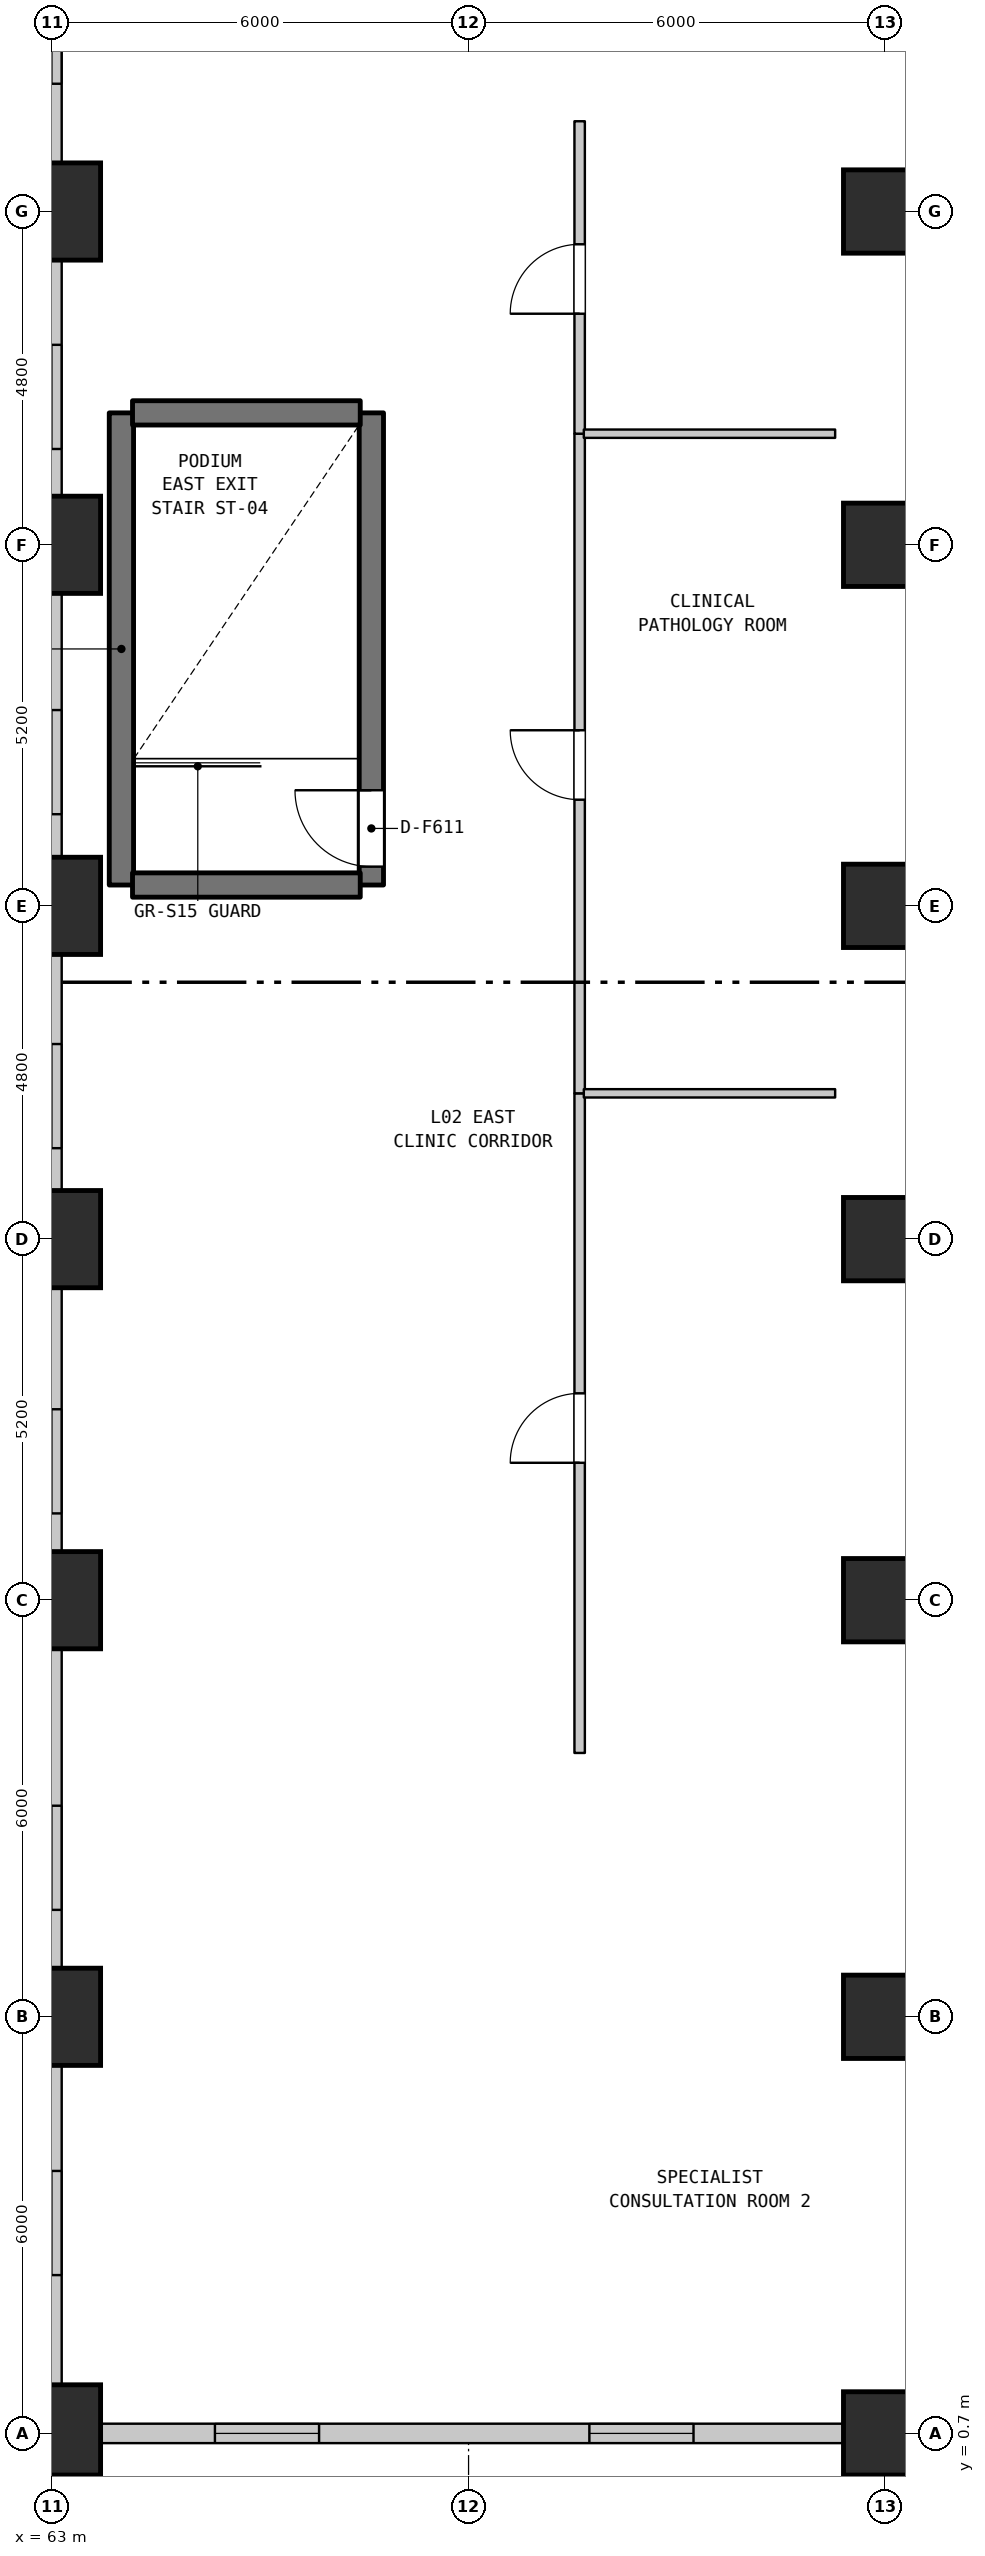
"""IFC4 building model, lengths in metres.
Left out: names, types, materials, properties, quantities, classifications, styles, units other than length and angle.
Written with IfcOpenShell. Run it as: python <this file> out.ifc"""

import sys

from ifc_helpers import new_model, si_unit, direction, frame, frame_2d, origin, origin_2d, place, context, subcontext, project, spatial, rectangle, extrude, element, fill, save


model = new_model("IFC4")
c1 = context("Model", 3, precision=1e-05, world=origin(), true_north=direction((0.0, 1.0)))
c2 = subcontext(c1, "Body", "Model", "MODEL_VIEW")
j1 = project(units=[si_unit("LENGTHUNIT", "METRE"), si_unit("PLANEANGLEUNIT", "RADIAN")], contexts=[c1])
p1 = place(None, origin())
s1 = spatial("IfcSite", under=j1, at=p1, CompositionType="ELEMENT")
p2 = place(p1, origin())
s2 = spatial("IfcBuilding", under=s1, at=p2, CompositionType="ELEMENT")
p3 = place(p2, frame((0.0, 0.0, 13.0)))
s3 = spatial("IfcBuildingStorey", under=s2, at=p3, CompositionType="ELEMENT", Elevation=13.0)
for number, where, z_axis, x_axis in (
    (1, (63.0, 0.7, 0.0), (0.0, 0.0, 1.0), (1.0, 0.0, 0.0)),
    (2, (63.0, 6.7, 0.0), (0.0, 0.0, 1.0), (1.0, 0.0, 0.0)),
    (3, (63.0, 12.7, 0.0), (0.0, 0.0, 1.0), (1.0, 0.0, 0.0)),
    (4, (63.0, 17.9, 0.0), (0.0, 0.0, 1.0), (1.0, 0.0, 0.0)),
    (5, (63.0, 22.7, 0.0), (0.0, 0.0, 1.0), (1.0, 0.0, 0.0)),
    (6, (63.0, 27.9, 0.0), (0.0, 0.0, 1.0), (1.0, 0.0, 0.0)),
    (7, (63.0, 32.7, 0.0), (0.0, 0.0, 1.0), (1.0, 0.0, 0.0)),
):
    element("IfcColumn", number, at=place(p3, frame(where, z_axis=z_axis, x_axis=x_axis)), inside=s3, PredefinedType="PILASTER", context=c2, shape_type="SweptSolid", body=[
        extrude(rectangle(XDim=1.4, YDim=1.4, at=origin_2d()), origin(), (0.0, 0.0, 1.0), 6.0),
    ])
for number, where, z_axis, x_axis in (
    (8, (75.0, 0.7, 0.0), (0.0, 0.0, 1.0), (1.0, 0.0, 0.0)),
    (9, (75.0, 6.7, 0.0), (0.0, 0.0, 1.0), (1.0, 0.0, 0.0)),
    (10, (75.0, 12.7, 0.0), (0.0, 0.0, 1.0), (1.0, 0.0, 0.0)),
    (11, (75.0, 17.9, 0.0), (0.0, 0.0, 1.0), (1.0, 0.0, 0.0)),
    (12, (75.0, 22.7, 0.0), (0.0, 0.0, 1.0), (1.0, 0.0, 0.0)),
    (13, (75.0, 27.9, 0.0), (0.0, 0.0, 1.0), (1.0, 0.0, 0.0)),
    (14, (75.0, 32.7, 0.0), (0.0, 0.0, 1.0), (1.0, 0.0, 0.0)),
):
    element("IfcColumn", number, at=place(p3, frame(where, z_axis=z_axis, x_axis=x_axis)), inside=s3, PredefinedType="PILASTER", context=c2, shape_type="SweptSolid", body=[
        extrude(rectangle(XDim=1.2, YDim=1.2, at=origin_2d()), origin(), (0.0, 0.0, 1.0), 6.0),
    ])
p4 = place(p3, frame((76.707, 2.407, 0.0), z_axis=(0.0, 0.0, 1.0), x_axis=(-0.707106781187, -0.707106781187, 0.0)))
e15 = element("IfcWall", 15, at=p4, inside=s3, PredefinedType="STANDARD", context=c2, shape_type="SweptSolid", body=[
    extrude(rectangle(XDim=2.0, YDim=0.28, at=frame_2d((1.0, 0.0))), origin(), (0.0, 0.0, 1.0), 5.58),
])
p5 = place(p3, frame((75.293, 0.993, 0.0), z_axis=(0.0, 0.0, 1.0), x_axis=(-0.92383017907, -0.382802560388, 0.0)))
e16 = element("IfcWall", 16, at=p5, inside=s3, PredefinedType="STANDARD", context=c2, shape_type="SweptSolid", body=[
    extrude(rectangle(XDim=0.765, YDim=0.28, at=frame_2d((0.383, 0.0))), origin(), (0.0, 0.0, 1.0), 5.58),
])
p6 = place(p3, frame((74.586, 0.7, 0.0), z_axis=(0.0, 0.0, 1.0), x_axis=(-1.0, 0.0, 0.0)))
e17 = element("IfcWall", 17, at=p6, inside=s3, PredefinedType="STANDARD", context=c2, shape_type="SweptSolid", body=[
    extrude(rectangle(XDim=11.586, YDim=0.28, at=frame_2d((5.793, 0.0))), origin(), (0.0, 0.0, 1.0), 4.38),
])
p7 = place(p6, frame((2.346, 0.0, 0.95)))
e18 = element("IfcOpeningElement", 18, at=p7, cuts=e17, PredefinedType="OPENING", context=c2, shape_type="SweptSolid", body=[
    extrude(rectangle(XDim=1.5, YDim=1.8, at=frame_2d((0.75, 0.9))), frame((0.0, 0.15, 0.0), z_axis=(0.0, -1.0, 0.0), x_axis=(1.0, 0.0, 0.0)), (0.0, 0.0, 1.0), 0.3),
])
p8 = place(p6, frame((7.739, 0.0, 0.95)))
e19 = element("IfcOpeningElement", 19, at=p8, cuts=e17, PredefinedType="OPENING", context=c2, shape_type="SweptSolid", body=[
    extrude(rectangle(XDim=1.5, YDim=1.8, at=frame_2d((0.75, 0.9))), frame((0.0, 0.15, 0.0), z_axis=(0.0, -1.0, 0.0), x_axis=(1.0, 0.0, 0.0)), (0.0, 0.0, 1.0), 0.3),
])
p9 = place(p3, frame((63.0, 0.7, 0.0), z_axis=(0.0, 0.0, 1.0), x_axis=(0.0, 1.0, 0.0)))
e20 = element("IfcWall", 20, at=p9, inside=s3, PredefinedType="STANDARD", context=c2, shape_type="SweptSolid", body=[
    extrude(rectangle(XDim=6.0, YDim=0.28, at=frame_2d((3.0, 0.0))), origin(), (0.0, 0.0, 1.0), 5.58),
])
p10 = place(p9, frame((2.28, 0.0, 0.95)))
e21 = element("IfcOpeningElement", 21, at=p10, cuts=e20, PredefinedType="OPENING", context=c2, shape_type="SweptSolid", body=[
    extrude(rectangle(XDim=1.5, YDim=1.8, at=frame_2d((0.75, 0.9))), frame((0.0, 0.15, 0.0), z_axis=(0.0, -1.0, 0.0), x_axis=(1.0, 0.0, 0.0)), (0.0, 0.0, 1.0), 0.3),
])
p11 = place(p3, frame((64.0, 23.0, 0.0), z_axis=(0.0, 0.0, 1.0), x_axis=(0.0, 1.0, 0.0)))
e22 = element("IfcWall", 22, at=p11, inside=s3, PredefinedType="SHEAR", context=c2, shape_type="SweptSolid", body=[
    extrude(rectangle(XDim=6.8, YDim=0.35, at=frame_2d((3.4, 0.0))), origin(), (0.0, 0.0, 1.0), 5.58),
])
p12 = place(p3, frame((67.6, 23.0, 0.0), z_axis=(0.0, 0.0, 1.0), x_axis=(0.0, 1.0, 0.0)))
e23 = element("IfcWall", 23, at=p12, inside=s3, PredefinedType="SHEAR", context=c2, shape_type="SweptSolid", body=[
    extrude(rectangle(XDim=6.8, YDim=0.35, at=frame_2d((3.4, 0.0))), origin(), (0.0, 0.0, 1.0), 5.58),
])
p13 = place(p12, frame((0.265, 0.0, 0.0)))
e24 = element("IfcOpeningElement", 24, at=p13, cuts=e23, PredefinedType="OPENING", context=c2, shape_type="SweptSolid", body=[
    extrude(rectangle(XDim=1.1, YDim=2.15, at=frame_2d((0.55, 1.075))), frame((0.0, 0.185, 0.0), z_axis=(0.0, -1.0, 0.0), x_axis=(1.0, 0.0, 0.0)), (0.0, 0.0, 1.0), 0.37),
])
p14 = place(p3, frame((70.6, 10.5, 0.0), z_axis=(0.0, 0.0, 1.0), x_axis=(0.0, 1.0, 0.0)))
e25 = element("IfcWall", 25, at=p14, inside=s3, PredefinedType="STANDARD", context=c2, shape_type="SweptSolid", body=[
    extrude(rectangle(XDim=9.5, YDim=0.15, at=frame_2d((4.75, 0.0))), origin(), (0.0, 0.0, 1.0), 5.58),
])
p15 = place(p14, frame((4.179, 0.0, 0.0)))
e26 = element("IfcOpeningElement", 26, at=p15, cuts=e25, PredefinedType="OPENING", context=c2, shape_type="SweptSolid", body=[
    extrude(rectangle(XDim=1.0, YDim=2.15, at=frame_2d((0.5, 1.075))), frame((0.0, 0.085, 0.0), z_axis=(0.0, -1.0, 0.0), x_axis=(1.0, 0.0, 0.0)), (0.0, 0.0, 1.0), 0.17),
])
p16 = place(p3, frame((70.6, 20.0, 0.0), z_axis=(0.0, 0.0, 1.0), x_axis=(0.0, 1.0, 0.0)))
e27 = element("IfcWall", 27, at=p16, inside=s3, PredefinedType="STANDARD", context=c2, shape_type="SweptSolid", body=[
    extrude(rectangle(XDim=9.5, YDim=0.15, at=frame_2d((4.75, 0.0))), origin(), (0.0, 0.0, 1.0), 5.58),
])
p17 = place(p16, frame((4.229, 0.0, 0.0)))
e28 = element("IfcOpeningElement", 28, at=p17, cuts=e27, PredefinedType="OPENING", context=c2, shape_type="SweptSolid", body=[
    extrude(rectangle(XDim=1.0, YDim=2.15, at=frame_2d((0.5, 1.075))), frame((0.0, 0.085, 0.0), z_axis=(0.0, -1.0, 0.0), x_axis=(1.0, 0.0, 0.0)), (0.0, 0.0, 1.0), 0.17),
])
p18 = place(p3, frame((70.6, 29.5, 0.0), z_axis=(0.0, 0.0, 1.0), x_axis=(0.0, 1.0, 0.0)))
e29 = element("IfcWall", 29, at=p18, inside=s3, PredefinedType="STANDARD", context=c2, shape_type="SweptSolid", body=[
    extrude(rectangle(XDim=4.5, YDim=0.15, at=frame_2d((2.25, 0.0))), origin(), (0.0, 0.0, 1.0), 5.58),
])
p19 = place(p18, frame((1.728, 0.0, 0.0)))
e30 = element("IfcOpeningElement", 30, at=p19, cuts=e29, PredefinedType="OPENING", context=c2, shape_type="SweptSolid", body=[
    extrude(rectangle(XDim=1.0, YDim=2.15, at=frame_2d((0.5, 1.075))), frame((0.0, 0.085, 0.0), z_axis=(0.0, -1.0, 0.0), x_axis=(1.0, 0.0, 0.0)), (0.0, 0.0, 1.0), 0.17),
])
p20 = place(p3, frame((70.66, 20.0, 0.0), z_axis=(0.0, 0.0, 1.0), x_axis=(1.0, 0.0, 0.0)))
e31 = element("IfcWall", 31, at=p20, inside=s3, PredefinedType="PARTITIONING", context=c2, shape_type="SweptSolid", body=[
    extrude(rectangle(XDim=3.62, YDim=0.12, at=frame_2d((1.81, 0.0))), origin(), (0.0, 0.0, 1.0), 5.58),
])
p21 = place(p3, frame((64.16, 23.0, 0.0), z_axis=(0.0, 0.0, 1.0), x_axis=(1.0, 0.0, 0.0)))
e32 = element("IfcWall", 32, at=p21, inside=s3, PredefinedType="SHEAR", context=c2, shape_type="SweptSolid", body=[
    extrude(rectangle(XDim=3.28, YDim=0.35, at=frame_2d((1.64, 0.0))), origin(), (0.0, 0.0, 1.0), 5.58),
])
p22 = place(p3, frame((70.66, 29.5, 0.0), z_axis=(0.0, 0.0, 1.0), x_axis=(1.0, 0.0, 0.0)))
e33 = element("IfcWall", 33, at=p22, inside=s3, PredefinedType="PARTITIONING", context=c2, shape_type="SweptSolid", body=[
    extrude(rectangle(XDim=3.62, YDim=0.12, at=frame_2d((1.81, 0.0))), origin(), (0.0, 0.0, 1.0), 5.58),
])
p23 = place(p3, frame((64.16, 29.8, 0.0), z_axis=(0.0, 0.0, 1.0), x_axis=(1.0, 0.0, 0.0)))
e34 = element("IfcWall", 34, at=p23, inside=s3, PredefinedType="SHEAR", context=c2, shape_type="SweptSolid", body=[
    extrude(rectangle(XDim=3.28, YDim=0.35, at=frame_2d((1.64, 0.0))), origin(), (0.0, 0.0, 1.0), 5.58),
])
p24 = place(p3, frame((63.0, 6.7, 0.0), z_axis=(0.0, 0.0, 1.0), x_axis=(0.0, 1.0, 0.0)))
e35 = element("IfcWall", 35, at=p24, inside=s3, PredefinedType="STANDARD", context=c2, shape_type="SweptSolid", body=[
    extrude(rectangle(XDim=6.0, YDim=0.28, at=frame_2d((3.0, 0.0))), origin(), (0.0, 0.0, 1.0), 4.98),
])
p25 = place(p24, frame((1.54, 0.0, 0.95)))
e36 = element("IfcOpeningElement", 36, at=p25, cuts=e35, PredefinedType="OPENING", context=c2, shape_type="SweptSolid", body=[
    extrude(rectangle(XDim=1.5, YDim=1.8, at=frame_2d((0.75, 0.9))), frame((0.0, 0.15, 0.0), z_axis=(0.0, -1.0, 0.0), x_axis=(1.0, 0.0, 0.0)), (0.0, 0.0, 1.0), 0.3),
])
p26 = place(p3, frame((63.0, 12.7, 0.0), z_axis=(0.0, 0.0, 1.0), x_axis=(0.0, 1.0, 0.0)))
e37 = element("IfcWall", 37, at=p26, inside=s3, PredefinedType="STANDARD", context=c2, shape_type="SweptSolid", body=[
    extrude(rectangle(XDim=20.0, YDim=0.28, at=frame_2d((10.0, 0.0))), origin(), (0.0, 0.0, 1.0), 5.08),
])
p27 = place(p26, frame((1.25, 0.0, 0.95)))
e38 = element("IfcOpeningElement", 38, at=p27, cuts=e37, PredefinedType="OPENING", context=c2, shape_type="SweptSolid", body=[
    extrude(rectangle(XDim=1.5, YDim=1.8, at=frame_2d((0.75, 0.9))), frame((0.0, 0.15, 0.0), z_axis=(0.0, -1.0, 0.0), x_axis=(1.0, 0.0, 0.0)), (0.0, 0.0, 1.0), 0.3),
])
p28 = place(p26, frame((6.51, 0.0, 0.95)))
e39 = element("IfcOpeningElement", 39, at=p28, cuts=e37, PredefinedType="OPENING", context=c2, shape_type="SweptSolid", body=[
    extrude(rectangle(XDim=1.5, YDim=1.8, at=frame_2d((0.75, 0.9))), frame((0.0, 0.15, 0.0), z_axis=(0.0, -1.0, 0.0), x_axis=(1.0, 0.0, 0.0)), (0.0, 0.0, 1.0), 0.3),
])
p29 = place(p26, frame((11.32, 0.0, 0.95)))
e40 = element("IfcOpeningElement", 40, at=p29, cuts=e37, PredefinedType="OPENING", context=c2, shape_type="SweptSolid", body=[
    extrude(rectangle(XDim=1.5, YDim=1.8, at=frame_2d((0.75, 0.9))), frame((0.0, 0.15, 0.0), z_axis=(0.0, -1.0, 0.0), x_axis=(1.0, 0.0, 0.0)), (0.0, 0.0, 1.0), 0.3),
])
p30 = place(p26, frame((16.58, 0.0, 0.95)))
e41 = element("IfcOpeningElement", 41, at=p30, cuts=e37, PredefinedType="OPENING", context=c2, shape_type="SweptSolid", body=[
    extrude(rectangle(XDim=1.5, YDim=1.8, at=frame_2d((0.75, 0.9))), frame((0.0, 0.15, 0.0), z_axis=(0.0, -1.0, 0.0), x_axis=(1.0, 0.0, 0.0)), (0.0, 0.0, 1.0), 0.3),
])
p31 = place(p3, frame((63.0, 32.7, 0.0), z_axis=(0.0, 0.0, 1.0), x_axis=(0.0, 1.0, 0.0)))
e42 = element("IfcWall", 42, at=p31, inside=s3, PredefinedType="STANDARD", context=c2, shape_type="SweptSolid", body=[
    extrude(rectangle(XDim=21.4, YDim=0.28, at=frame_2d((10.7, 0.0))), origin(), (0.0, 0.0, 1.0), 5.58),
])
p32 = place(p31, frame((1.84, 0.0, 0.95)))
e43 = element("IfcOpeningElement", 43, at=p32, cuts=e42, PredefinedType="OPENING", context=c2, shape_type="SweptSolid", body=[
    extrude(rectangle(XDim=1.5, YDim=1.8, at=frame_2d((0.75, 0.9))), frame((0.0, 0.15, 0.0), z_axis=(0.0, -1.0, 0.0), x_axis=(1.0, 0.0, 0.0)), (0.0, 0.0, 1.0), 0.3),
])
p33 = place(p31, frame((7.1, 0.0, 0.95)))
e44 = element("IfcOpeningElement", 44, at=p33, cuts=e42, PredefinedType="OPENING", context=c2, shape_type="SweptSolid", body=[
    extrude(rectangle(XDim=1.5, YDim=1.8, at=frame_2d((0.75, 0.9))), frame((0.0, 0.15, 0.0), z_axis=(0.0, -1.0, 0.0), x_axis=(1.0, 0.0, 0.0)), (0.0, 0.0, 1.0), 0.3),
])
p34 = place(p31, frame((12.36, 0.0, 0.95)))
e45 = element("IfcOpeningElement", 45, at=p34, cuts=e42, PredefinedType="OPENING", context=c2, shape_type="SweptSolid", body=[
    extrude(rectangle(XDim=1.5, YDim=1.8, at=frame_2d((0.75, 0.9))), frame((0.0, 0.15, 0.0), z_axis=(0.0, -1.0, 0.0), x_axis=(1.0, 0.0, 0.0)), (0.0, 0.0, 1.0), 0.3),
])
p35 = place(p31, frame((17.62, 0.0, 0.95)))
e46 = element("IfcOpeningElement", 46, at=p35, cuts=e42, PredefinedType="OPENING", context=c2, shape_type="SweptSolid", body=[
    extrude(rectangle(XDim=1.5, YDim=1.8, at=frame_2d((0.75, 0.9))), frame((0.0, 0.15, 0.0), z_axis=(0.0, -1.0, 0.0), x_axis=(1.0, 0.0, 0.0)), (0.0, 0.0, 1.0), 0.3),
])
p36 = place(p7, origin())
e47 = element("IfcWindow", 47, at=p36, inside=s3, PartitioningType="SINGLE_PANEL", PredefinedType="WINDOW", context=c2, shape_type="SweptSolid", body=[
    extrude(rectangle(XDim=1.5, YDim=1.8, at=frame_2d((0.75, 0.9))), frame((0.0, 0.03, 0.0), z_axis=(0.0, -1.0, 0.0), x_axis=(1.0, 0.0, 0.0)), (0.0, 0.0, 1.0), 0.06),
])
fill(e18, e47)
p37 = place(p8, origin())
e48 = element("IfcWindow", 48, at=p37, inside=s3, PartitioningType="SINGLE_PANEL", PredefinedType="WINDOW", context=c2, shape_type="SweptSolid", body=[
    extrude(rectangle(XDim=1.5, YDim=1.8, at=frame_2d((0.75, 0.9))), frame((0.0, 0.03, 0.0), z_axis=(0.0, -1.0, 0.0), x_axis=(1.0, 0.0, 0.0)), (0.0, 0.0, 1.0), 0.06),
])
fill(e19, e48)
p38 = place(p10, origin())
e49 = element("IfcWindow", 49, at=p38, inside=s3, PartitioningType="SINGLE_PANEL", PredefinedType="WINDOW", context=c2, shape_type="SweptSolid", body=[
    extrude(rectangle(XDim=1.5, YDim=1.8, at=frame_2d((0.75, 0.9))), frame((0.0, 0.03, 0.0), z_axis=(0.0, -1.0, 0.0), x_axis=(1.0, 0.0, 0.0)), (0.0, 0.0, 1.0), 0.06),
])
fill(e21, e49)
p39 = place(p25, origin())
e50 = element("IfcWindow", 50, at=p39, inside=s3, PartitioningType="SINGLE_PANEL", PredefinedType="WINDOW", context=c2, shape_type="SweptSolid", body=[
    extrude(rectangle(XDim=1.5, YDim=1.8, at=frame_2d((0.75, 0.9))), frame((0.0, 0.03, 0.0), z_axis=(0.0, -1.0, 0.0), x_axis=(1.0, 0.0, 0.0)), (0.0, 0.0, 1.0), 0.06),
])
fill(e36, e50)
p40 = place(p27, origin())
e51 = element("IfcWindow", 51, at=p40, inside=s3, PartitioningType="SINGLE_PANEL", PredefinedType="WINDOW", context=c2, shape_type="SweptSolid", body=[
    extrude(rectangle(XDim=1.5, YDim=1.8, at=frame_2d((0.75, 0.9))), frame((0.0, 0.03, 0.0), z_axis=(0.0, -1.0, 0.0), x_axis=(1.0, 0.0, 0.0)), (0.0, 0.0, 1.0), 0.06),
])
fill(e38, e51)
p41 = place(p28, origin())
e52 = element("IfcWindow", 52, at=p41, inside=s3, PartitioningType="SINGLE_PANEL", PredefinedType="WINDOW", context=c2, shape_type="SweptSolid", body=[
    extrude(rectangle(XDim=1.5, YDim=1.8, at=frame_2d((0.75, 0.9))), frame((0.0, 0.03, 0.0), z_axis=(0.0, -1.0, 0.0), x_axis=(1.0, 0.0, 0.0)), (0.0, 0.0, 1.0), 0.06),
])
fill(e39, e52)
p42 = place(p29, origin())
e53 = element("IfcWindow", 53, at=p42, inside=s3, PartitioningType="SINGLE_PANEL", PredefinedType="WINDOW", context=c2, shape_type="SweptSolid", body=[
    extrude(rectangle(XDim=1.5, YDim=1.8, at=frame_2d((0.75, 0.9))), frame((0.0, 0.03, 0.0), z_axis=(0.0, -1.0, 0.0), x_axis=(1.0, 0.0, 0.0)), (0.0, 0.0, 1.0), 0.06),
])
fill(e40, e53)
p43 = place(p30, origin())
e54 = element("IfcWindow", 54, at=p43, inside=s3, PartitioningType="SINGLE_PANEL", PredefinedType="WINDOW", context=c2, shape_type="SweptSolid", body=[
    extrude(rectangle(XDim=1.5, YDim=1.8, at=frame_2d((0.75, 0.9))), frame((0.0, 0.03, 0.0), z_axis=(0.0, -1.0, 0.0), x_axis=(1.0, 0.0, 0.0)), (0.0, 0.0, 1.0), 0.06),
])
fill(e41, e54)
p44 = place(p32, origin())
e55 = element("IfcWindow", 55, at=p44, inside=s3, PartitioningType="SINGLE_PANEL", PredefinedType="WINDOW", context=c2, shape_type="SweptSolid", body=[
    extrude(rectangle(XDim=1.5, YDim=1.8, at=frame_2d((0.75, 0.9))), frame((0.0, 0.03, 0.0), z_axis=(0.0, -1.0, 0.0), x_axis=(1.0, 0.0, 0.0)), (0.0, 0.0, 1.0), 0.06),
])
fill(e43, e55)
p45 = place(p13, origin())
e56 = element("IfcDoor", 56, at=p45, inside=s3, OperationType="SINGLE_SWING_RIGHT", PredefinedType="DOOR", context=c2, shape_type="SweptSolid", body=[
    extrude(rectangle(XDim=1.1, YDim=2.15, at=frame_2d((0.55, 1.075))), frame((0.0, 0.025, 0.0), z_axis=(0.0, -1.0, 0.0), x_axis=(1.0, 0.0, 0.0)), (0.0, 0.0, 1.0), 0.05),
])
fill(e24, e56)
p46 = place(p15, origin())
e57 = element("IfcDoor", 57, at=p46, inside=s3, OperationType="SINGLE_SWING_LEFT", PredefinedType="DOOR", context=c2, shape_type="SweptSolid", body=[
    extrude(rectangle(XDim=1.0, YDim=2.15, at=frame_2d((0.5, 1.075))), frame((0.0, 0.025, 0.0), z_axis=(0.0, -1.0, 0.0), x_axis=(1.0, 0.0, 0.0)), (0.0, 0.0, 1.0), 0.05),
])
fill(e26, e57)
p47 = place(p17, origin())
e58 = element("IfcDoor", 58, at=p47, inside=s3, OperationType="SINGLE_SWING_RIGHT", PredefinedType="DOOR", context=c2, shape_type="SweptSolid", body=[
    extrude(rectangle(XDim=1.0, YDim=2.15, at=frame_2d((0.5, 1.075))), frame((0.0, 0.025, 0.0), z_axis=(0.0, -1.0, 0.0), x_axis=(1.0, 0.0, 0.0)), (0.0, 0.0, 1.0), 0.05),
])
fill(e28, e58)
p48 = place(p19, origin())
e59 = element("IfcDoor", 59, at=p48, inside=s3, OperationType="SINGLE_SWING_LEFT", PredefinedType="DOOR", context=c2, shape_type="SweptSolid", body=[
    extrude(rectangle(XDim=1.0, YDim=2.15, at=frame_2d((0.5, 1.075))), frame((0.0, 0.025, 0.0), z_axis=(0.0, -1.0, 0.0), x_axis=(1.0, 0.0, 0.0)), (0.0, 0.0, 1.0), 0.05),
])
fill(e30, e59)
save(model, sys.argv[1])
